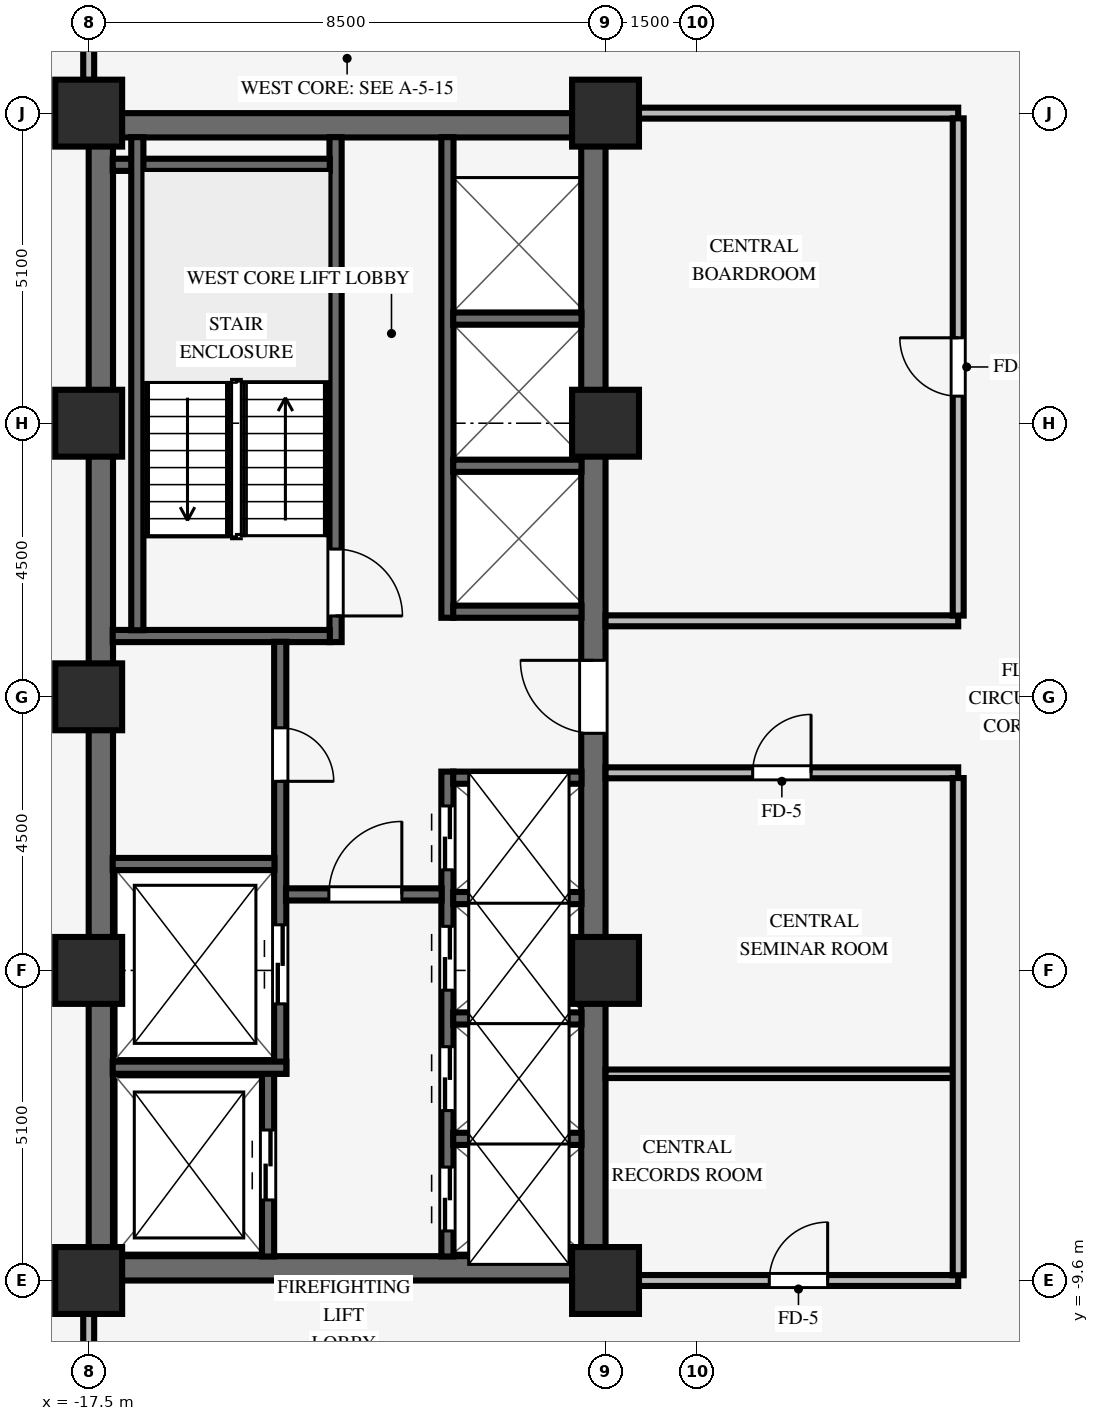
"""IFC4 building model, lengths in metres.
Left out: names, types, materials, properties, quantities, classifications, styles, units other than length and angle.
Written with IfcOpenShell. Run it as: python <this file> out.ifc"""

import sys

from ifc_helpers import new_model, si_unit, direction, frame, frame_2d, origin, origin_2d, place, context, subcontext, project, spatial, rectangle, extrude, source, transform, mapped, element, fill, save


model = new_model("IFC4")
c1 = context("Model", 3, precision=1e-05, world=origin(), true_north=direction((0.0, 1.0)))
c2 = subcontext(c1, "Body", "Model", "MODEL_VIEW")
j1 = project(units=[si_unit("LENGTHUNIT", "METRE"), si_unit("PLANEANGLEUNIT", "RADIAN")], contexts=[c1])
p1 = place(None, origin())
s1 = spatial("IfcSite", under=j1, at=p1, CompositionType="ELEMENT")
p2 = place(p1, origin())
s2 = spatial("IfcBuilding", under=s1, at=p2, CompositionType="ELEMENT")
p3 = place(p2, frame((0.0, 0.0, 116.55)))
s3 = spatial("IfcBuildingStorey", under=s2, at=p3, CompositionType="ELEMENT", Elevation=116.55)
for number, where, z_axis, x_axis in (
    (1, (-17.5, -9.4, 0.0), (0.0, 0.0, 1.0), (1.0, 0.0, 0.0)),
    (2, (-17.5, 9.4, 0.0), (0.0, 0.0, 1.0), (1.0, 0.0, 0.0)),
):
    element("IfcWall", number, at=place(p3, frame(where, z_axis=z_axis, x_axis=x_axis)), inside=s3, PredefinedType="SHEAR", context=c2, shape_type="SweptSolid", body=[
        extrude(rectangle(XDim=8.5, YDim=0.4, at=frame_2d((4.25, 0.0))), origin(), (0.0, 0.0, 1.0), 3.37),
    ])
p4 = place(p3, frame((-17.3, -9.205, 0.0), z_axis=(0.0, 0.0, 1.0), x_axis=(0.0, 1.0, 0.0)))
e3 = element("IfcWall", 3, at=p4, inside=s3, PredefinedType="SHEAR", context=c2, shape_type="SweptSolid", body=[
    extrude(rectangle(XDim=18.41, YDim=0.4, at=frame_2d((9.205, 0.0))), origin(), (0.0, 0.0, 1.0), 3.37),
])
p5 = place(p3, frame((-9.2, -9.205, 0.0), z_axis=(0.0, 0.0, 1.0), x_axis=(0.0, 1.0, 0.0)))
e4 = element("IfcWall", 4, at=p5, inside=s3, PredefinedType="SHEAR", context=c2, shape_type="SweptSolid", body=[
    extrude(rectangle(XDim=18.41, YDim=0.4, at=frame_2d((9.205, 0.0))), origin(), (0.0, 0.0, 1.0), 3.37),
])
p6 = place(p5, frame((8.605, 0.0, 0.0)))
e5 = element("IfcOpeningElement", 5, at=p6, cuts=e4, PredefinedType="OPENING", context=c2, shape_type="SweptSolid", body=[
    extrude(rectangle(XDim=1.2, YDim=2.15, at=frame_2d((0.6, 1.075))), frame((0.0, 0.21, 0.0), z_axis=(0.0, -1.0, 0.0), x_axis=(1.0, 0.0, 0.0)), (0.0, 0.0, 1.0), 0.42),
])
for number, where, z_axis, x_axis in (
    (6, (-17.5, -9.6, 0.0), (0.0, 0.0, 1.0), (1.0, 0.0, 0.0)),
    (7, (-17.5, -4.5, 0.0), (0.0, 0.0, 1.0), (1.0, 0.0, 0.0)),
    (8, (-17.5, 4.5, 0.0), (0.0, 0.0, 1.0), (1.0, 0.0, 0.0)),
    (9, (-17.5, 9.6, 0.0), (0.0, 0.0, 1.0), (1.0, 0.0, 0.0)),
    (10, (-9.0, -9.6, 0.0), (0.0, 0.0, 1.0), (1.0, 0.0, 0.0)),
    (11, (-9.0, -4.5, 0.0), (0.0, 0.0, 1.0), (1.0, 0.0, 0.0)),
    (12, (-9.0, 4.5, 0.0), (0.0, 0.0, 1.0), (1.0, 0.0, 0.0)),
    (13, (-9.0, 9.6, 0.0), (0.0, 0.0, 1.0), (1.0, 0.0, 0.0)),
    (14, (-17.5, 0.0, 0.0), (0.0, 0.0, 1.0), (1.0, 0.0, 0.0)),
):
    element("IfcColumn", number, at=place(p3, frame(where, z_axis=z_axis, x_axis=x_axis)), inside=s3, PredefinedType="COLUMN", context=c2, shape_type="SweptSolid", body=[
        extrude(rectangle(XDim=1.1, YDim=1.1, at=origin_2d()), origin(), (0.0, 0.0, 1.0), 3.37),
    ])
p7 = place(p3, frame((-13.44, 0.9, 0.0), z_axis=(0.0, 0.0, 1.0), x_axis=(0.0, 1.0, 0.0)))
e15 = element("IfcWall", 15, at=p7, inside=s3, PredefinedType="SHEAR", context=c2, shape_type="SweptSolid", body=[
    extrude(rectangle(XDim=8.305, YDim=0.2, at=frame_2d((4.153, 0.0))), origin(), (0.0, 0.0, 1.0), 3.37),
])
p8 = place(p7, frame((1.53, 0.0, 0.0), z_axis=(0.0, 0.0, 1.0), x_axis=(-1.0, 0.0, 0.0)))
e16 = element("IfcOpeningElement", 16, at=p8, cuts=e15, PredefinedType="OPENING", context=c2, shape_type="SweptSolid", body=[
    extrude(rectangle(XDim=1.1, YDim=2.15, at=frame_2d((0.55, 1.075))), frame((0.0, 0.11, 0.0), z_axis=(0.0, -1.0, 0.0), x_axis=(1.0, 0.0, 0.0)), (0.0, 0.0, 1.0), 0.22),
])
for number, where, z_axis, x_axis in (
    (17, (-17.105, 1.0, 0.0), (0.0, 0.0, 1.0), (1.0, 0.0, 0.0)),
    (18, (-17.105, 8.75, 0.0), (0.0, 0.0, 1.0), (1.0, 0.0, 0.0)),
):
    element("IfcWall", number, at=place(p3, frame(where, z_axis=z_axis, x_axis=x_axis)), inside=s3, PredefinedType="SHEAR", context=c2, shape_type="SweptSolid", body=[
        extrude(rectangle(XDim=3.57, YDim=0.2, at=frame_2d((1.785, 0.0))), origin(), (0.0, 0.0, 1.0), 3.37),
    ])
p9 = place(p3, frame((-16.7, 1.095, 0.0), z_axis=(0.0, 0.0, 1.0), x_axis=(0.0, 1.0, 0.0)))
e19 = element("IfcWall", 19, at=p9, inside=s3, PredefinedType="SHEAR", context=c2, shape_type="SweptSolid", body=[
    extrude(rectangle(XDim=8.11, YDim=0.2, at=frame_2d((4.055, 0.0))), origin(), (0.0, 0.0, 1.0), 3.37),
])
p10 = place(p3, frame((-14.55, -9.205, 0.0), z_axis=(0.0, 0.0, 1.0), x_axis=(0.0, 1.0, 0.0)))
e20 = element("IfcWall", 20, at=p10, inside=s3, PredefinedType="SHEAR", context=c2, shape_type="SweptSolid", body=[
    extrude(rectangle(XDim=3.01, YDim=0.2, at=frame_2d((1.505, 0.0))), origin(), (0.0, 0.0, 1.0), 3.37),
])
p11 = place(p10, frame((0.93, 0.0, 0.0)))
e21 = element("IfcOpeningElement", 21, at=p11, cuts=e20, PredefinedType="OPENING", context=c2, shape_type="SweptSolid", body=[
    extrude(rectangle(XDim=1.15, YDim=2.15, at=frame_2d((0.575, 1.075))), frame((0.0, 0.11, 0.0), z_axis=(0.0, -1.0, 0.0), x_axis=(1.0, 0.0, 0.0)), (0.0, 0.0, 1.0), 0.22),
])
p12 = place(p3, frame((-14.35, -6.2, 0.0), z_axis=(0.0, 0.0, 1.0), x_axis=(0.0, 1.0, 0.0)))
e22 = element("IfcWall", 22, at=p12, inside=s3, PredefinedType="SHEAR", context=c2, shape_type="SweptSolid", body=[
    extrude(rectangle(XDim=7.105, YDim=0.2, at=frame_2d((3.552, 0.0))), origin(), (0.0, 0.0, 1.0), 3.37),
])
p13 = place(p12, frame((5.69, 0.0, 0.0), z_axis=(0.0, 0.0, 1.0), x_axis=(-1.0, 0.0, 0.0)))
e23 = element("IfcOpeningElement", 23, at=p13, cuts=e22, PredefinedType="OPENING", context=c2, shape_type="SweptSolid", body=[
    extrude(rectangle(XDim=0.88, YDim=2.1, at=frame_2d((0.44, 1.05))), frame((0.0, 0.11, 0.0), z_axis=(0.0, -1.0, 0.0), x_axis=(1.0, 0.0, 0.0)), (0.0, 0.0, 1.0), 0.22),
])
p14 = place(p12, frame((1.15, 0.0, 0.0)))
e24 = element("IfcOpeningElement", 24, at=p14, cuts=e22, PredefinedType="OPENING", context=c2, shape_type="SweptSolid", body=[
    extrude(rectangle(XDim=1.3, YDim=2.2, at=frame_2d((0.65, 1.1))), frame((0.0, 0.11, 0.0), z_axis=(0.0, -1.0, 0.0), x_axis=(1.0, 0.0, 0.0)), (0.0, 0.0, 1.0), 0.22),
])
p15 = place(p3, frame((-17.105, -6.1, 0.0), z_axis=(0.0, 0.0, 1.0), x_axis=(1.0, 0.0, 0.0)))
e25 = element("IfcWall", 25, at=p15, inside=s3, PredefinedType="SHEAR", context=c2, shape_type="SweptSolid", body=[
    extrude(rectangle(XDim=2.855, YDim=0.2, at=frame_2d((1.427, 0.0))), origin(), (0.0, 0.0, 1.0), 3.37),
])
p16 = place(p3, frame((-17.105, -2.75, 0.0), z_axis=(0.0, 0.0, 1.0), x_axis=(1.0, 0.0, 0.0)))
e26 = element("IfcWall", 26, at=p16, inside=s3, PredefinedType="SHEAR", context=c2, shape_type="SweptSolid", body=[
    extrude(rectangle(XDim=2.66, YDim=0.2, at=frame_2d((1.33, 0.0))), origin(), (0.0, 0.0, 1.0), 3.37),
])
p17 = place(p3, frame((-11.6, -9.205, 0.0), z_axis=(0.0, 0.0, 1.0), x_axis=(0.0, 1.0, 0.0)))
e27 = element("IfcWall", 27, at=p17, inside=s3, PredefinedType="SHEAR", context=c2, shape_type="SweptSolid", body=[
    extrude(rectangle(XDim=7.975, YDim=0.2, at=frame_2d((3.988, 0.0))), origin(), (0.0, 0.0, 1.0), 3.37),
])
p18 = place(p17, frame((0.42, 0.0, 0.0)))
e28 = element("IfcOpeningElement", 28, at=p18, cuts=e27, PredefinedType="OPENING", context=c2, shape_type="SweptSolid", body=[
    extrude(rectangle(XDim=1.05, YDim=2.15, at=frame_2d((0.525, 1.075))), frame((0.0, 0.11, 0.0), z_axis=(0.0, -1.0, 0.0), x_axis=(1.0, 0.0, 0.0)), (0.0, 0.0, 1.0), 0.22),
])
p19 = place(p17, frame((2.4, 0.0, 0.0)))
e29 = element("IfcOpeningElement", 29, at=p19, cuts=e27, PredefinedType="OPENING", context=c2, shape_type="SweptSolid", body=[
    extrude(rectangle(XDim=1.05, YDim=2.15, at=frame_2d((0.525, 1.075))), frame((0.0, 0.11, 0.0), z_axis=(0.0, -1.0, 0.0), x_axis=(1.0, 0.0, 0.0)), (0.0, 0.0, 1.0), 0.22),
])
p20 = place(p17, frame((4.38, 0.0, 0.0)))
e30 = element("IfcOpeningElement", 30, at=p20, cuts=e27, PredefinedType="OPENING", context=c2, shape_type="SweptSolid", body=[
    extrude(rectangle(XDim=1.05, YDim=2.15, at=frame_2d((0.525, 1.075))), frame((0.0, 0.11, 0.0), z_axis=(0.0, -1.0, 0.0), x_axis=(1.0, 0.0, 0.0)), (0.0, 0.0, 1.0), 0.22),
])
p21 = place(p17, frame((6.36, 0.0, 0.0)))
e31 = element("IfcOpeningElement", 31, at=p21, cuts=e27, PredefinedType="OPENING", context=c2, shape_type="SweptSolid", body=[
    extrude(rectangle(XDim=1.05, YDim=2.15, at=frame_2d((0.525, 1.075))), frame((0.0, 0.11, 0.0), z_axis=(0.0, -1.0, 0.0), x_axis=(1.0, 0.0, 0.0)), (0.0, 0.0, 1.0), 0.22),
])
p22 = place(p3, frame((-14.255, -3.25, 0.0), z_axis=(0.0, 0.0, 1.0), x_axis=(1.0, 0.0, 0.0)))
e32 = element("IfcWall", 32, at=p22, inside=s3, PredefinedType="SHEAR", context=c2, shape_type="SweptSolid", body=[
    extrude(rectangle(XDim=2.56, YDim=0.2, at=frame_2d((1.28, 0.0))), origin(), (0.0, 0.0, 1.0), 3.37),
])
p23 = place(p22, frame((0.705, 0.0, 0.0)))
e33 = element("IfcOpeningElement", 33, at=p23, cuts=e32, PredefinedType="OPENING", context=c2, shape_type="SweptSolid", body=[
    extrude(rectangle(XDim=1.2, YDim=2.15, at=frame_2d((0.6, 1.075))), frame((0.0, 0.11, 0.0), z_axis=(0.0, -1.0, 0.0), x_axis=(1.0, 0.0, 0.0)), (0.0, 0.0, 1.0), 0.22),
])
for number, where, z_axis, x_axis in (
    (34, (-11.505, -7.27, 0.0), (0.0, 0.0, 1.0), (1.0, 0.0, 0.0)),
    (35, (-11.505, -5.29, 0.0), (0.0, 0.0, 1.0), (1.0, 0.0, 0.0)),
    (36, (-11.505, -3.31, 0.0), (0.0, 0.0, 1.0), (1.0, 0.0, 0.0)),
    (37, (-11.505, -1.33, 0.0), (0.0, 0.0, 1.0), (1.0, 0.0, 0.0)),
):
    element("IfcWall", number, at=place(p3, frame(where, z_axis=z_axis, x_axis=x_axis)), inside=s3, PredefinedType="SHEAR", context=c2, shape_type="SweptSolid", body=[
        extrude(rectangle(XDim=2.11, YDim=0.2, at=frame_2d((1.055, 0.0))), origin(), (0.0, 0.0, 1.0), 3.37),
    ])
p24 = place(p3, frame((-11.6, 1.3, 0.0), z_axis=(0.0, 0.0, 1.0), x_axis=(0.0, 1.0, 0.0)))
e38 = element("IfcWall", 38, at=p24, inside=s3, PredefinedType="SHEAR", context=c2, shape_type="SweptSolid", body=[
    extrude(rectangle(XDim=7.905, YDim=0.2, at=frame_2d((3.953, 0.0))), origin(), (0.0, 0.0, 1.0), 3.37),
])
for number, where, z_axis, x_axis in (
    (39, (-11.505, 1.4, 0.0), (0.0, 0.0, 1.0), (1.0, 0.0, 0.0)),
    (40, (-11.505, 3.8, 0.0), (0.0, 0.0, 1.0), (1.0, 0.0, 0.0)),
    (41, (-11.505, 6.22, 0.0), (0.0, 0.0, 1.0), (1.0, 0.0, 0.0)),
):
    element("IfcWall", number, at=place(p3, frame(where, z_axis=z_axis, x_axis=x_axis)), inside=s3, PredefinedType="SHEAR", context=c2, shape_type="SweptSolid", body=[
        extrude(rectangle(XDim=2.11, YDim=0.2, at=frame_2d((1.055, 0.0))), origin(), (0.0, 0.0, 1.0), 3.37),
    ])
p25 = place(p3, frame((-8.454, -9.6, 0.0), z_axis=(0.0, 0.0, 1.0), x_axis=(1.0, 0.0, 0.0)))
e42 = element("IfcWall", 42, at=p25, inside=s3, PredefinedType="PARTITIONING", context=c2, shape_type="SweptSolid", body=[
    extrude(rectangle(XDim=5.254, YDim=0.18, at=frame_2d((2.627, 0.0))), origin(), (0.0, 0.0, 1.0), 2.405),
])
p26 = place(p25, frame((2.147, 0.0, 0.0)))
e43 = element("IfcOpeningElement", 43, at=p26, cuts=e42, PredefinedType="OPENING", context=c2, shape_type="SweptSolid", body=[
    extrude(rectangle(XDim=0.96, YDim=2.1, at=frame_2d((0.48, 1.05))), frame((0.0, 0.1, 0.0), z_axis=(0.0, -1.0, 0.0), x_axis=(1.0, 0.0, 0.0)), (0.0, 0.0, 1.0), 0.2),
])
p27 = place(p3, frame((-9.0, -6.2, 0.0), z_axis=(0.0, 0.0, 1.0), x_axis=(1.0, 0.0, 0.0)))
e44 = element("IfcWall", 44, at=p27, inside=s3, PredefinedType="PARTITIONING", context=c2, shape_type="SweptSolid", body=[
    extrude(rectangle(XDim=5.714, YDim=0.14, at=frame_2d((2.857, 0.0))), origin(), (0.0, 0.0, 1.0), 3.36),
])
p28 = place(p3, frame((-9.0, -1.25, 0.0), z_axis=(0.0, 0.0, 1.0), x_axis=(1.0, 0.0, 0.0)))
e45 = element("IfcWall", 45, at=p28, inside=s3, PredefinedType="PARTITIONING", context=c2, shape_type="SweptSolid", body=[
    extrude(rectangle(XDim=5.8, YDim=0.18, at=frame_2d((2.9, 0.0))), origin(), (0.0, 0.0, 1.0), 3.36),
])
p29 = place(p28, frame((2.42, 0.0, 0.0)))
e46 = element("IfcOpeningElement", 46, at=p29, cuts=e45, PredefinedType="OPENING", context=c2, shape_type="SweptSolid", body=[
    extrude(rectangle(XDim=0.96, YDim=2.1, at=frame_2d((0.48, 1.05))), frame((0.0, 0.1, 0.0), z_axis=(0.0, -1.0, 0.0), x_axis=(1.0, 0.0, 0.0)), (0.0, 0.0, 1.0), 0.2),
])
p30 = place(p3, frame((-9.0, 1.25, 0.0), z_axis=(0.0, 0.0, 1.0), x_axis=(1.0, 0.0, 0.0)))
e47 = element("IfcWall", 47, at=p30, inside=s3, PredefinedType="PARTITIONING", context=c2, shape_type="SweptSolid", body=[
    extrude(rectangle(XDim=5.8, YDim=0.18, at=frame_2d((2.9, 0.0))), origin(), (0.0, 0.0, 1.0), 3.36),
])
p31 = place(p3, frame((-8.454, 9.6, 0.0), z_axis=(0.0, 0.0, 1.0), x_axis=(1.0, 0.0, 0.0)))
e48 = element("IfcWall", 48, at=p31, inside=s3, PredefinedType="PARTITIONING", context=c2, shape_type="SweptSolid", body=[
    extrude(rectangle(XDim=5.254, YDim=0.18, at=frame_2d((2.627, 0.0))), origin(), (0.0, 0.0, 1.0), 2.405),
])
for number, where, z_axis, x_axis in (
    (49, (-17.5, -11.114, 0.0), (0.0, 0.0, 1.0), (0.0, 1.0, 0.0)),
    (50, (-17.5, 10.146, 0.0), (0.0, 0.0, 1.0), (0.0, 1.0, 0.0)),
):
    element("IfcWall", number, at=place(p3, frame(where, z_axis=z_axis, x_axis=x_axis)), inside=s3, PredefinedType="PARTITIONING", context=c2, shape_type="SweptSolid", body=[
        extrude(rectangle(XDim=0.968, YDim=0.18, at=frame_2d((0.484, 0.0))), origin(), (0.0, 0.0, 1.0), 2.738),
    ])
p32 = place(p3, frame((-3.2, -9.514, 0.0), z_axis=(0.0, 0.0, 1.0), x_axis=(0.0, 1.0, 0.0)))
e51 = element("IfcWall", 51, at=p32, inside=s3, PredefinedType="PARTITIONING", context=c2, shape_type="SweptSolid", body=[
    extrude(rectangle(XDim=8.178, YDim=0.18, at=frame_2d((4.089, 0.0))), origin(), (0.0, 0.0, 1.0), 3.36),
])
p33 = place(p3, frame((-3.2, 1.336, 0.0), z_axis=(0.0, 0.0, 1.0), x_axis=(0.0, 1.0, 0.0)))
e52 = element("IfcWall", 52, at=p33, inside=s3, PredefinedType="PARTITIONING", context=c2, shape_type="SweptSolid", body=[
    extrude(rectangle(XDim=8.178, YDim=0.18, at=frame_2d((4.089, 0.0))), origin(), (0.0, 0.0, 1.0), 3.36),
])
p34 = place(p33, frame((3.609, 0.0, 0.0)))
e53 = element("IfcOpeningElement", 53, at=p34, cuts=e52, PredefinedType="OPENING", context=c2, shape_type="SweptSolid", body=[
    extrude(rectangle(XDim=0.96, YDim=2.1, at=frame_2d((0.48, 1.05))), frame((0.0, 0.1, 0.0), z_axis=(0.0, -1.0, 0.0), x_axis=(1.0, 0.0, 0.0)), (0.0, 0.0, 1.0), 0.2),
])
m1 = source(origin(), c2, "Body", "SweptSolid", [
    extrude(rectangle(XDim=1.1, YDim=2.15, at=frame_2d((0.55, 1.075))), frame((0.0, 0.025, 0.0), z_axis=(0.0, -1.0, 0.0), x_axis=(1.0, 0.0, 0.0)), (0.0, 0.0, 1.0), 0.05),
])
p35 = place(p8, origin())
e54 = element("IfcDoor", 54, at=p35, inside=s3, OperationType="SINGLE_SWING_RIGHT", PredefinedType="DOOR", context=c2, shape_type="MappedRepresentation", body=[
    mapped(m1, transform((0.0, 0.0, 0.0), scale=1.0)),
])
fill(e16, e54)
m2 = source(origin(), c2, "Body", "SweptSolid", [
    extrude(rectangle(XDim=0.88, YDim=2.1, at=frame_2d((0.44, 1.05))), frame((0.0, 0.025, 0.0), z_axis=(0.0, -1.0, 0.0), x_axis=(1.0, 0.0, 0.0)), (0.0, 0.0, 1.0), 0.05),
])
p36 = place(p13, origin())
e55 = element("IfcDoor", 55, at=p36, inside=s3, OperationType="SINGLE_SWING_RIGHT", PredefinedType="DOOR", context=c2, shape_type="MappedRepresentation", body=[
    mapped(m2, transform((0.0, 0.0, 0.0), scale=1.0)),
])
fill(e23, e55)
m3 = source(origin(), c2, "Body", "SweptSolid", [
    extrude(rectangle(XDim=1.2, YDim=2.15, at=frame_2d((0.6, 1.075))), frame((0.0, 0.025, 0.0), z_axis=(0.0, -1.0, 0.0), x_axis=(1.0, 0.0, 0.0)), (0.0, 0.0, 1.0), 0.05),
])
p37 = place(p23, origin())
e56 = element("IfcDoor", 56, at=p37, inside=s3, OperationType="SINGLE_SWING_RIGHT", PredefinedType="DOOR", context=c2, shape_type="MappedRepresentation", body=[
    mapped(m3, transform((0.0, 0.0, 0.0), scale=1.0)),
])
fill(e33, e56)
p38 = place(p6, origin())
e57 = element("IfcDoor", 57, at=p38, inside=s3, OperationType="SINGLE_SWING_RIGHT", PredefinedType="DOOR", context=c2, shape_type="MappedRepresentation", body=[
    mapped(m3, transform((0.0, 0.0, 0.0), scale=1.0)),
])
fill(e5, e57)
m4 = source(origin(), c2, "Body", "SweptSolid", [
    extrude(rectangle(XDim=1.15, YDim=2.15, at=frame_2d((0.575, 1.075))), frame((0.0, 0.025, 0.0), z_axis=(0.0, -1.0, 0.0), x_axis=(1.0, 0.0, 0.0)), (0.0, 0.0, 1.0), 0.05),
])
p39 = place(p11, origin())
e58 = element("IfcDoor", 58, at=p39, inside=s3, OperationType="DOUBLE_DOOR_SLIDING", PredefinedType="DOOR", context=c2, shape_type="MappedRepresentation", body=[
    mapped(m4, transform((0.0, 0.0, 0.0), scale=1.0)),
])
fill(e21, e58)
m5 = source(origin(), c2, "Body", "SweptSolid", [
    extrude(rectangle(XDim=1.3, YDim=2.2, at=frame_2d((0.65, 1.1))), frame((0.0, 0.025, 0.0), z_axis=(0.0, -1.0, 0.0), x_axis=(1.0, 0.0, 0.0)), (0.0, 0.0, 1.0), 0.05),
])
p40 = place(p14, origin())
e59 = element("IfcDoor", 59, at=p40, inside=s3, OperationType="DOUBLE_DOOR_SLIDING", PredefinedType="DOOR", context=c2, shape_type="MappedRepresentation", body=[
    mapped(m5, transform((0.0, 0.0, 0.0), scale=1.0)),
])
fill(e24, e59)
m6 = source(origin(), c2, "Body", "SweptSolid", [
    extrude(rectangle(XDim=1.05, YDim=2.15, at=frame_2d((0.525, 1.075))), frame((0.0, 0.025, 0.0), z_axis=(0.0, -1.0, 0.0), x_axis=(1.0, 0.0, 0.0)), (0.0, 0.0, 1.0), 0.05),
])
p41 = place(p18, origin())
e60 = element("IfcDoor", 60, at=p41, inside=s3, OperationType="DOUBLE_DOOR_SLIDING", PredefinedType="DOOR", context=c2, shape_type="MappedRepresentation", body=[
    mapped(m6, transform((0.0, 0.0, 0.0), scale=1.0)),
])
fill(e28, e60)
p42 = place(p19, origin())
e61 = element("IfcDoor", 61, at=p42, inside=s3, OperationType="DOUBLE_DOOR_SLIDING", PredefinedType="DOOR", context=c2, shape_type="MappedRepresentation", body=[
    mapped(m6, transform((0.0, 0.0, 0.0), scale=1.0)),
])
fill(e29, e61)
p43 = place(p20, origin())
e62 = element("IfcDoor", 62, at=p43, inside=s3, OperationType="DOUBLE_DOOR_SLIDING", PredefinedType="DOOR", context=c2, shape_type="MappedRepresentation", body=[
    mapped(m6, transform((0.0, 0.0, 0.0), scale=1.0)),
])
fill(e30, e62)
p44 = place(p21, origin())
e63 = element("IfcDoor", 63, at=p44, inside=s3, OperationType="DOUBLE_DOOR_SLIDING", PredefinedType="DOOR", context=c2, shape_type="MappedRepresentation", body=[
    mapped(m6, transform((0.0, 0.0, 0.0), scale=1.0)),
])
fill(e31, e63)
m7 = source(origin(), c2, "Body", "SweptSolid", [
    extrude(rectangle(XDim=0.96, YDim=2.1, at=frame_2d((0.48, 1.05))), frame((0.0, 0.025, 0.0), z_axis=(0.0, -1.0, 0.0), x_axis=(1.0, 0.0, 0.0)), (0.0, 0.0, 1.0), 0.05),
])
p45 = place(p34, origin())
e64 = element("IfcDoor", 64, at=p45, inside=s3, OperationType="SINGLE_SWING_RIGHT", PredefinedType="DOOR", context=c2, shape_type="MappedRepresentation", body=[
    mapped(m7, transform((0.0, 0.0, 0.0), scale=1.0)),
])
fill(e53, e64)
p46 = place(p29, origin())
e65 = element("IfcDoor", 65, at=p46, inside=s3, OperationType="SINGLE_SWING_RIGHT", PredefinedType="DOOR", context=c2, shape_type="MappedRepresentation", body=[
    mapped(m7, transform((0.0, 0.0, 0.0), scale=1.0)),
])
fill(e46, e65)
p47 = place(p26, origin())
e66 = element("IfcDoor", 66, at=p47, inside=s3, OperationType="SINGLE_SWING_RIGHT", PredefinedType="DOOR", context=c2, shape_type="MappedRepresentation", body=[
    mapped(m7, transform((0.0, 0.0, 0.0), scale=1.0)),
])
fill(e43, e66)
save(model, sys.argv[1])
